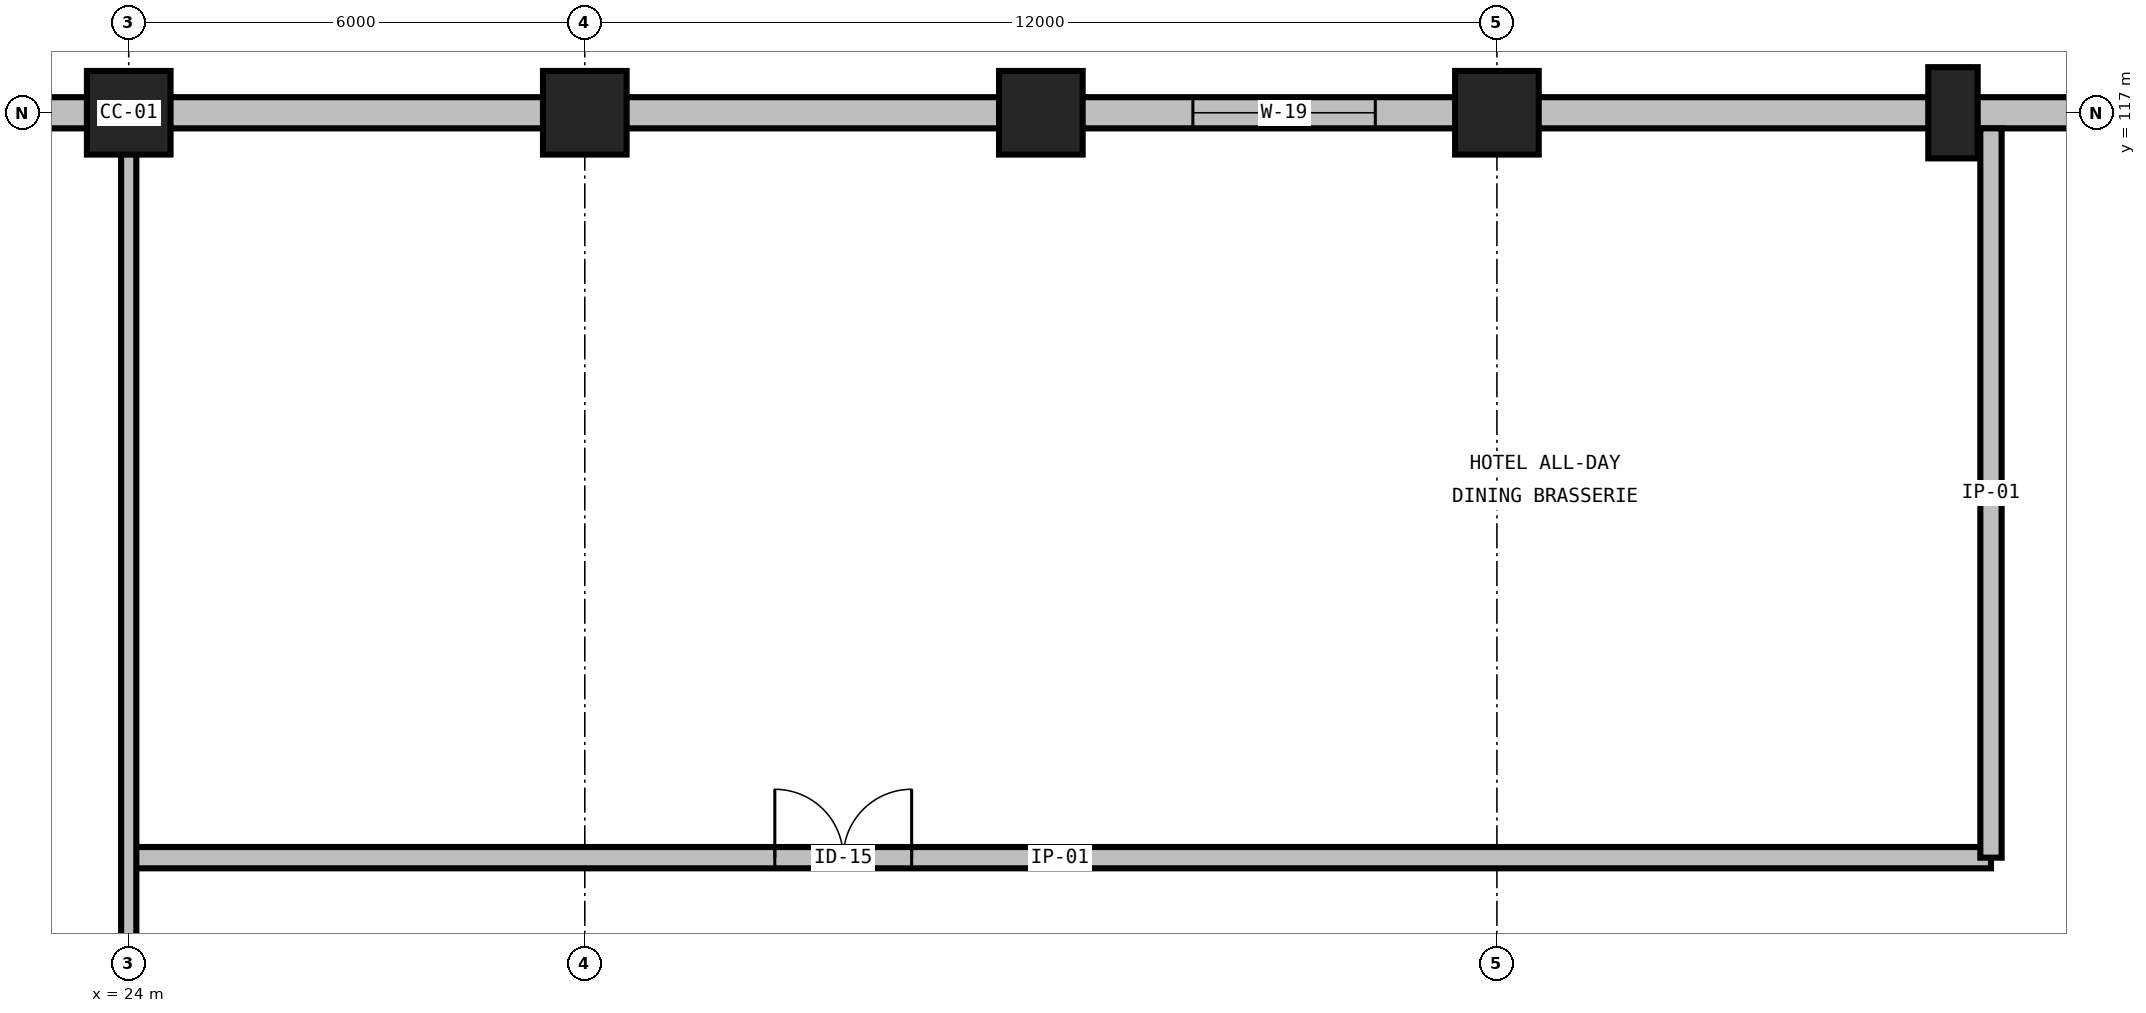
"""IFC4 building model, lengths in metres.
Left out: names, types, materials, properties, quantities, classifications, styles, units other than length and angle.
Written with IfcOpenShell. Run it as: python <this file> out.ifc"""

import sys

from ifc_helpers import new_model, si_unit, direction, frame, frame_2d, origin, origin_2d, place, context, subcontext, project, spatial, rectangle, extrude, element, fill, save


model = new_model("IFC4")
c1 = context("Model", 3, precision=1e-05, world=origin(), true_north=direction((0.0, 1.0)))
c2 = subcontext(c1, "Body", "Model", "MODEL_VIEW")
j1 = project(units=[si_unit("LENGTHUNIT", "METRE"), si_unit("PLANEANGLEUNIT", "RADIAN")], contexts=[c1])
p1 = place(None, origin())
s1 = spatial("IfcSite", under=j1, at=p1, CompositionType="ELEMENT")
p2 = place(p1, origin())
s2 = spatial("IfcBuilding", under=s1, at=p2, CompositionType="ELEMENT")
p3 = place(p2, frame((0.0, 0.0, 6.0)))
s3 = spatial("IfcBuildingStorey", under=s2, at=p3, CompositionType="ELEMENT", Elevation=6.0)
for number, where, z_axis, x_axis in (
    (1, (24.0, 117.0, 0.0), (0.0, 0.0, 1.0), (1.0, 0.0, 0.0)),
    (2, (30.0, 117.0, 0.0), (0.0, 0.0, 1.0), (1.0, 0.0, 0.0)),
    (3, (36.0, 117.0, 0.0), (0.0, 0.0, 1.0), (1.0, 0.0, 0.0)),
    (4, (42.0, 117.0, 0.0), (0.0, 0.0, 1.0), (1.0, 0.0, 0.0)),
):
    element("IfcColumn", number, at=place(p3, frame(where, z_axis=z_axis, x_axis=x_axis)), inside=s3, PredefinedType="COLUMN", context=c2, shape_type="SweptSolid", body=[
        extrude(rectangle(XDim=1.1, YDim=1.1, at=origin_2d()), origin(), (0.0, 0.0, 1.0), 6.0),
    ])
p4 = place(p3, frame((48.0, 117.0, 0.0), z_axis=(0.0, 0.0, 1.0), x_axis=(1.0, 0.0, 0.0)))
e5 = element("IfcColumn", 5, at=p4, inside=s3, PredefinedType="PILASTER", context=c2, shape_type="SweptSolid", body=[
    extrude(rectangle(XDim=0.65, YDim=1.2, at=origin_2d()), origin(), (0.0, 0.0, 1.0), 6.0),
])
p5 = place(p3, frame((24.0, 117.0, 0.0), z_axis=(0.0, 0.0, 1.0), x_axis=(-1.0, 0.0, 0.0)))
e6 = element("IfcWall", 6, at=p5, inside=s3, PredefinedType="STANDARD", context=c2, shape_type="SweptSolid", body=[
    extrude(rectangle(XDim=12.0, YDim=0.41, at=frame_2d((6.0, 0.0))), origin(), (0.0, 0.0, 1.0), 4.676),
])
p6 = place(p5, frame((1.6, 0.0, 0.9)))
e7 = element("IfcOpeningElement", 7, at=p6, cuts=e6, PredefinedType="OPENING", context=c2, shape_type="SweptSolid", body=[
    extrude(rectangle(XDim=2.4, YDim=2.15, at=frame_2d((1.2, 1.075))), frame((0.0, 0.22, 0.0), z_axis=(0.0, -1.0, 0.0), x_axis=(1.0, 0.0, 0.0)), (0.0, 0.0, 1.0), 0.44),
])
p7 = place(p3, frame((30.0, 117.0, 0.0), z_axis=(0.0, 0.0, 1.0), x_axis=(-1.0, 0.0, 0.0)))
e8 = element("IfcWall", 8, at=p7, inside=s3, PredefinedType="STANDARD", context=c2, shape_type="SweptSolid", body=[
    extrude(rectangle(XDim=6.0, YDim=0.41, at=frame_2d((3.0, 0.0))), origin(), (0.0, 0.0, 1.0), 4.676),
])
p8 = place(p3, frame((42.0, 117.0, 0.0), z_axis=(0.0, 0.0, 1.0), x_axis=(-1.0, 0.0, 0.0)))
e9 = element("IfcWall", 9, at=p8, inside=s3, PredefinedType="STANDARD", context=c2, shape_type="SweptSolid", body=[
    extrude(rectangle(XDim=12.0, YDim=0.41, at=frame_2d((6.0, 0.0))), origin(), (0.0, 0.0, 1.0), 4.676),
])
p9 = place(p8, frame((1.6, 0.0, 0.9)))
e10 = element("IfcOpeningElement", 10, at=p9, cuts=e9, PredefinedType="OPENING", context=c2, shape_type="SweptSolid", body=[
    extrude(rectangle(XDim=2.4, YDim=2.15, at=frame_2d((1.2, 1.075))), frame((0.0, 0.22, 0.0), z_axis=(0.0, -1.0, 0.0), x_axis=(1.0, 0.0, 0.0)), (0.0, 0.0, 1.0), 0.44),
])
p10 = place(p3, frame((54.0, 117.0, 0.0), z_axis=(0.0, 0.0, 1.0), x_axis=(-1.0, 0.0, 0.0)))
e11 = element("IfcWall", 11, at=p10, inside=s3, PredefinedType="STANDARD", context=c2, shape_type="SweptSolid", body=[
    extrude(rectangle(XDim=12.0, YDim=0.41, at=frame_2d((6.0, 0.0))), origin(), (0.0, 0.0, 1.0), 4.676),
])
p11 = place(p3, frame((24.0, 107.2, 0.0), z_axis=(0.0, 0.0, 1.0), x_axis=(1.0, 0.0, 0.0)))
e12 = element("IfcWall", 12, at=p11, inside=s3, PredefinedType="PARTITIONING", context=c2, shape_type="SweptSolid", body=[
    extrude(rectangle(XDim=24.5, YDim=0.28, at=frame_2d((12.25, 0.0))), origin(), (0.0, 0.0, 1.0), 5.68),
])
p12 = place(p11, frame((8.5, 0.0, 0.0)))
e13 = element("IfcOpeningElement", 13, at=p12, cuts=e12, PredefinedType="OPENING", context=c2, shape_type="SweptSolid", body=[
    extrude(rectangle(XDim=1.8, YDim=2.3, at=frame_2d((0.9, 1.15))), frame((0.0, 0.155, 0.0), z_axis=(0.0, -1.0, 0.0), x_axis=(1.0, 0.0, 0.0)), (0.0, 0.0, 1.0), 0.31),
])
p13 = place(p3, frame((48.5, 107.2, 0.0), z_axis=(0.0, 0.0, 1.0), x_axis=(0.0, 1.0, 0.0)))
e14 = element("IfcWall", 14, at=p13, inside=s3, PredefinedType="PARTITIONING", context=c2, shape_type="SweptSolid", body=[
    extrude(rectangle(XDim=9.595, YDim=0.28, at=frame_2d((4.798, 0.0))), origin(), (0.0, 0.0, 1.0), 5.68),
])
p14 = place(p3, frame((24.0, 90.0, 0.0), z_axis=(0.0, 0.0, 1.0), x_axis=(0.0, 1.0, 0.0)))
e15 = element("IfcWall", 15, at=p14, inside=s3, PredefinedType="PARTITIONING", context=c2, shape_type="SweptSolid", body=[
    extrude(rectangle(XDim=26.795, YDim=0.2, at=frame_2d((13.397, 0.0))), origin(), (0.0, 0.0, 1.0), 4.83),
])
p15 = place(p9, origin())
e16 = element("IfcWindow", 16, at=p15, inside=s3, PartitioningType="DOUBLE_PANEL_VERTICAL", PredefinedType="WINDOW", context=c2, shape_type="SweptSolid", body=[
    extrude(rectangle(XDim=2.4, YDim=2.15, at=frame_2d((1.2, 1.075))), frame((0.0, 0.03, 0.0), z_axis=(0.0, -1.0, 0.0), x_axis=(1.0, 0.0, 0.0)), (0.0, 0.0, 1.0), 0.06),
])
fill(e10, e16)
p16 = place(p12, origin())
e17 = element("IfcDoor", 17, at=p16, inside=s3, OperationType="DOUBLE_DOOR_SINGLE_SWING", PredefinedType="DOOR", context=c2, shape_type="SweptSolid", body=[
    extrude(rectangle(XDim=1.8, YDim=2.3, at=frame_2d((0.9, 1.15))), frame((0.0, 0.025, 0.0), z_axis=(0.0, -1.0, 0.0), x_axis=(1.0, 0.0, 0.0)), (0.0, 0.0, 1.0), 0.05),
])
fill(e13, e17)
save(model, sys.argv[1])
